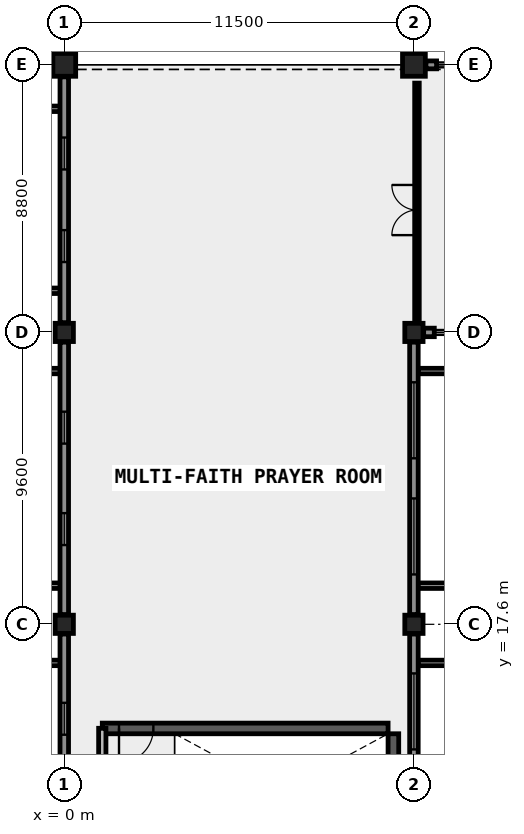
"""IFC4 building model, lengths in metres.
Left out: names, types, materials, properties, quantities, classifications, styles, units other than length and angle.
Written with IfcOpenShell. Run it as: python <this file> out.ifc"""

import sys

from ifc_helpers import new_model, si_unit, direction, frame, frame_2d, origin, origin_2d, place, context, subcontext, project, spatial, rectangle, extrude, element, fill, save


model = new_model("IFC4")
c1 = context("Model", 3, precision=1e-05, world=origin(), true_north=direction((0.0, 1.0)))
c2 = subcontext(c1, "Body", "Model", "MODEL_VIEW")
j1 = project(units=[si_unit("LENGTHUNIT", "METRE"), si_unit("PLANEANGLEUNIT", "RADIAN")], contexts=[c1])
p1 = place(None, origin())
s1 = spatial("IfcSite", under=j1, at=p1, CompositionType="ELEMENT")
p2 = place(p1, origin())
s2 = spatial("IfcBuilding", under=s1, at=p2, CompositionType="ELEMENT")
p3 = place(p2, frame((0.0, 0.0, 8.4)))
s3 = spatial("IfcBuildingStorey", under=s2, at=p3, CompositionType="ELEMENT", Elevation=8.4)
for number, where, z_axis, x_axis in (
    (1, (0.0, 17.6, 0.0), (0.0, 0.0, 1.0), (1.0, 0.0, 0.0)),
    (2, (0.0, 27.2, 0.0), (0.0, 0.0, 1.0), (1.0, 0.0, 0.0)),
):
    element("IfcColumn", number, at=place(p3, frame(where, z_axis=z_axis, x_axis=x_axis)), inside=s3, PredefinedType="COLUMN", context=c2, shape_type="SweptSolid", body=[
        extrude(rectangle(XDim=0.6, YDim=0.6, at=origin_2d()), origin(), (0.0, 0.0, 1.0), 5.4),
    ])
p4 = place(p3, frame((0.0, 36.0, 0.0), z_axis=(0.0, 0.0, 1.0), x_axis=(1.0, 0.0, 0.0)))
e3 = element("IfcColumn", 3, at=p4, inside=s3, PredefinedType="COLUMN", context=c2, shape_type="SweptSolid", body=[
    extrude(rectangle(XDim=0.75, YDim=0.75, at=origin_2d()), origin(), (0.0, 0.0, 1.0), 5.4),
])
for number, where, z_axis, x_axis in (
    (4, (11.5, 17.6, 0.0), (0.0, 0.0, 1.0), (1.0, 0.0, 0.0)),
    (5, (11.5, 27.2, 0.0), (0.0, 0.0, 1.0), (1.0, 0.0, 0.0)),
):
    element("IfcColumn", number, at=place(p3, frame(where, z_axis=z_axis, x_axis=x_axis)), inside=s3, PredefinedType="COLUMN", context=c2, shape_type="SweptSolid", body=[
        extrude(rectangle(XDim=0.6, YDim=0.6, at=origin_2d()), origin(), (0.0, 0.0, 1.0), 5.4),
    ])
p5 = place(p3, frame((11.5, 36.0, 0.0), z_axis=(0.0, 0.0, 1.0), x_axis=(1.0, 0.0, 0.0)))
e6 = element("IfcColumn", 6, at=p5, inside=s3, PredefinedType="COLUMN", context=c2, shape_type="SweptSolid", body=[
    extrude(rectangle(XDim=0.75, YDim=0.75, at=origin_2d()), origin(), (0.0, 0.0, 1.0), 5.4),
])
p6 = place(p3, frame((1.25, 14.175, 0.0), z_axis=(0.0, 0.0, 1.0), x_axis=(1.0, 0.0, 0.0)))
e7 = element("IfcWall", 7, at=p6, inside=s3, PredefinedType="SHEAR", context=c2, shape_type="SweptSolid", body=[
    extrude(rectangle(XDim=9.4, YDim=0.35, at=frame_2d((4.7, 0.0))), origin(), (0.0, 0.0, 1.0), 5.4),
])
p7 = place(p6, frame((0.55, 0.0, 0.0)))
e8 = element("IfcOpeningElement", 8, at=p7, cuts=e7, PredefinedType="OPENING", context=c2, shape_type="SweptSolid", body=[
    extrude(rectangle(XDim=1.13, YDim=2.15, at=frame_2d((0.565, 1.075))), frame((0.0, 0.185, 0.0), z_axis=(0.0, -1.0, 0.0), x_axis=(1.0, 0.0, 0.0)), (0.0, 0.0, 1.0), 0.37),
])
p8 = place(p3, frame((10.825, 10.2, 0.0), z_axis=(0.0, 0.0, 1.0), x_axis=(0.0, 1.0, 0.0)))
e9 = element("IfcWall", 9, at=p8, inside=s3, PredefinedType="SHEAR", context=c2, shape_type="SweptSolid", body=[
    extrude(rectangle(XDim=3.8, YDim=0.35, at=frame_2d((1.9, 0.0))), origin(), (0.0, 0.0, 1.0), 5.4),
])
p9 = place(p3, frame((11.5, 8.395, 0.0), z_axis=(0.0, 0.0, 1.0), x_axis=(0.0, 1.0, 0.0)))
e10 = element("IfcWall", 10, at=p9, inside=s3, PredefinedType="SOLIDWALL", context=c2, shape_type="SweptSolid", body=[
    extrude(rectangle(XDim=8.885, YDim=0.28, at=frame_2d((4.442, 0.0))), origin(), (0.0, 0.0, 1.0), 4.25),
])
p10 = place(p9, frame((1.295, 0.0, 0.85)))
e11 = element("IfcOpeningElement", 11, at=p10, cuts=e10, PredefinedType="OPENING", context=c2, shape_type="SweptSolid", body=[
    extrude(rectangle(XDim=2.5, YDim=2.2, at=frame_2d((1.25, 1.1))), frame((0.0, 0.15, 0.0), z_axis=(0.0, -1.0, 0.0), x_axis=(1.0, 0.0, 0.0)), (0.0, 0.0, 1.0), 0.3),
])
p11 = place(p9, frame((5.09, 0.0, 0.85)))
e12 = element("IfcOpeningElement", 12, at=p11, cuts=e10, PredefinedType="OPENING", context=c2, shape_type="SweptSolid", body=[
    extrude(rectangle(XDim=2.5, YDim=2.2, at=frame_2d((1.25, 1.1))), frame((0.0, 0.15, 0.0), z_axis=(0.0, -1.0, 0.0), x_axis=(1.0, 0.0, 0.0)), (0.0, 0.0, 1.0), 0.3),
])
p12 = place(p3, frame((11.5, 17.92, 0.0), z_axis=(0.0, 0.0, 1.0), x_axis=(0.0, 1.0, 0.0)))
e13 = element("IfcWall", 13, at=p12, inside=s3, PredefinedType="SOLIDWALL", context=c2, shape_type="SweptSolid", body=[
    extrude(rectangle(XDim=8.96, YDim=0.28, at=frame_2d((4.48, 0.0))), origin(), (0.0, 0.0, 1.0), 4.25),
])
p13 = place(p12, frame((1.32, 0.0, 0.85)))
e14 = element("IfcOpeningElement", 14, at=p13, cuts=e13, PredefinedType="OPENING", context=c2, shape_type="SweptSolid", body=[
    extrude(rectangle(XDim=2.5, YDim=2.2, at=frame_2d((1.25, 1.1))), frame((0.0, 0.15, 0.0), z_axis=(0.0, -1.0, 0.0), x_axis=(1.0, 0.0, 0.0)), (0.0, 0.0, 1.0), 0.3),
])
p14 = place(p12, frame((5.14, 0.0, 0.85)))
e15 = element("IfcOpeningElement", 15, at=p14, cuts=e13, PredefinedType="OPENING", context=c2, shape_type="SweptSolid", body=[
    extrude(rectangle(XDim=2.5, YDim=2.2, at=frame_2d((1.25, 1.1))), frame((0.0, 0.15, 0.0), z_axis=(0.0, -1.0, 0.0), x_axis=(1.0, 0.0, 0.0)), (0.0, 0.0, 1.0), 0.3),
])
p15 = place(p3, frame((11.82, 27.2, 0.0), z_axis=(0.0, 0.0, 1.0), x_axis=(1.0, 0.0, 0.0)))
e16 = element("IfcWall", 16, at=p15, inside=s3, PredefinedType="SOLIDWALL", context=c2, shape_type="SweptSolid", body=[
    extrude(rectangle(XDim=0.35, YDim=0.28, at=frame_2d((0.175, 0.0))), origin(), (0.0, 0.0, 1.0), 5.14),
])
p16 = place(p3, frame((0.0, 8.395, 0.0), z_axis=(0.0, 0.0, 1.0), x_axis=(0.0, 1.0, 0.0)))
e17 = element("IfcWall", 17, at=p16, inside=s3, PredefinedType="SOLIDWALL", context=c2, shape_type="SweptSolid", body=[
    extrude(rectangle(XDim=8.885, YDim=0.28, at=frame_2d((4.442, 0.0))), origin(), (0.0, 0.0, 1.0), 4.45),
])
p17 = place(p16, frame((2.262, 0.0, 0.85)))
e18 = element("IfcOpeningElement", 18, at=p17, cuts=e17, PredefinedType="OPENING", context=c2, shape_type="SweptSolid", body=[
    extrude(rectangle(XDim=1.05, YDim=2.05, at=frame_2d((0.525, 1.025))), frame((0.0, 0.15, 0.0), z_axis=(0.0, -1.0, 0.0), x_axis=(1.0, 0.0, 0.0)), (0.0, 0.0, 1.0), 0.3),
])
p18 = place(p16, frame((5.573, 0.0, 0.85)))
e19 = element("IfcOpeningElement", 19, at=p18, cuts=e17, PredefinedType="OPENING", context=c2, shape_type="SweptSolid", body=[
    extrude(rectangle(XDim=1.05, YDim=2.05, at=frame_2d((0.525, 1.025))), frame((0.0, 0.15, 0.0), z_axis=(0.0, -1.0, 0.0), x_axis=(1.0, 0.0, 0.0)), (0.0, 0.0, 1.0), 0.3),
])
p19 = place(p3, frame((0.0, 17.92, 0.0), z_axis=(0.0, 0.0, 1.0), x_axis=(0.0, 1.0, 0.0)))
e20 = element("IfcWall", 20, at=p19, inside=s3, PredefinedType="SOLIDWALL", context=c2, shape_type="SweptSolid", body=[
    extrude(rectangle(XDim=8.96, YDim=0.28, at=frame_2d((4.48, 0.0))), origin(), (0.0, 0.0, 1.0), 4.45),
])
p20 = place(p19, frame((2.287, 0.0, 0.85)))
e21 = element("IfcOpeningElement", 21, at=p20, cuts=e20, PredefinedType="OPENING", context=c2, shape_type="SweptSolid", body=[
    extrude(rectangle(XDim=1.05, YDim=2.05, at=frame_2d((0.525, 1.025))), frame((0.0, 0.15, 0.0), z_axis=(0.0, -1.0, 0.0), x_axis=(1.0, 0.0, 0.0)), (0.0, 0.0, 1.0), 0.3),
])
p21 = place(p19, frame((5.623, 0.0, 0.85)))
e22 = element("IfcOpeningElement", 22, at=p21, cuts=e20, PredefinedType="OPENING", context=c2, shape_type="SweptSolid", body=[
    extrude(rectangle(XDim=1.05, YDim=2.05, at=frame_2d((0.525, 1.025))), frame((0.0, 0.15, 0.0), z_axis=(0.0, -1.0, 0.0), x_axis=(1.0, 0.0, 0.0)), (0.0, 0.0, 1.0), 0.3),
])
p22 = place(p3, frame((0.0, 27.52, 0.0), z_axis=(0.0, 0.0, 1.0), x_axis=(0.0, 1.0, 0.0)))
e23 = element("IfcWall", 23, at=p22, inside=s3, PredefinedType="SOLIDWALL", context=c2, shape_type="SweptSolid", body=[
    extrude(rectangle(XDim=8.085, YDim=0.28, at=frame_2d((4.042, 0.0))), origin(), (0.0, 0.0, 1.0), 4.45),
])
p23 = place(p22, frame((1.995, 0.0, 0.85)))
e24 = element("IfcOpeningElement", 24, at=p23, cuts=e23, PredefinedType="OPENING", context=c2, shape_type="SweptSolid", body=[
    extrude(rectangle(XDim=1.05, YDim=2.05, at=frame_2d((0.525, 1.025))), frame((0.0, 0.15, 0.0), z_axis=(0.0, -1.0, 0.0), x_axis=(1.0, 0.0, 0.0)), (0.0, 0.0, 1.0), 0.3),
])
p24 = place(p22, frame((5.04, 0.0, 0.85)))
e25 = element("IfcOpeningElement", 25, at=p24, cuts=e23, PredefinedType="OPENING", context=c2, shape_type="SweptSolid", body=[
    extrude(rectangle(XDim=1.05, YDim=2.05, at=frame_2d((0.525, 1.025))), frame((0.0, 0.15, 0.0), z_axis=(0.0, -1.0, 0.0), x_axis=(1.0, 0.0, 0.0)), (0.0, 0.0, 1.0), 0.3),
])
p25 = place(p3, frame((11.895, 36.0, 0.0), z_axis=(0.0, 0.0, 1.0), x_axis=(1.0, 0.0, 0.0)))
e26 = element("IfcWall", 26, at=p25, inside=s3, PredefinedType="SOLIDWALL", context=c2, shape_type="SweptSolid", body=[
    extrude(rectangle(XDim=0.35, YDim=0.26, at=frame_2d((0.175, 0.0))), origin(), (0.0, 0.0, 1.0), 5.1),
])
p26 = place(p3, frame((1.25, 10.02, 0.0), z_axis=(0.0, 0.0, 1.0), x_axis=(0.0, 1.0, 0.0)))
e27 = element("IfcWall", 27, at=p26, inside=s3, PredefinedType="SOLIDWALL", context=c2, shape_type="SweptSolid", body=[
    extrude(rectangle(XDim=4.16, YDim=0.24, at=frame_2d((2.08, 0.0))), origin(), (0.0, 0.0, 1.0), 5.12),
])
p27 = place(p3, frame((11.6, 27.6, 0.0), z_axis=(0.0, 0.0, 1.0), x_axis=(0.0, 1.0, 0.0)))
e28 = element("IfcWall", 28, at=p27, inside=s3, PredefinedType="PARTITIONING", context=c2, shape_type="SweptSolid", body=[
    extrude(rectangle(XDim=7.8, YDim=0.15, at=frame_2d((3.9, 0.0))), origin(), (0.0, 0.0, 1.0), 4.25),
])
p28 = place(p27, frame((2.8, 0.0, 0.0)))
e29 = element("IfcOpeningElement", 29, at=p28, cuts=e28, PredefinedType="OPENING", context=c2, shape_type="SweptSolid", body=[
    extrude(rectangle(XDim=1.65, YDim=2.2, at=frame_2d((0.825, 1.1))), frame((0.0, 0.085, 0.0), z_axis=(0.0, -1.0, 0.0), x_axis=(1.0, 0.0, 0.0)), (0.0, 0.0, 1.0), 0.17),
])
p29 = place(p11, origin())
e30 = element("IfcWindow", 30, at=p29, inside=s3, PartitioningType="SINGLE_PANEL", PredefinedType="WINDOW", context=c2, shape_type="SweptSolid", body=[
    extrude(rectangle(XDim=2.5, YDim=2.2, at=frame_2d((1.25, 1.1))), frame((0.0, 0.03, 0.0), z_axis=(0.0, -1.0, 0.0), x_axis=(1.0, 0.0, 0.0)), (0.0, 0.0, 1.0), 0.06),
])
fill(e12, e30)
p30 = place(p13, origin())
e31 = element("IfcWindow", 31, at=p30, inside=s3, PartitioningType="SINGLE_PANEL", PredefinedType="WINDOW", context=c2, shape_type="SweptSolid", body=[
    extrude(rectangle(XDim=2.5, YDim=2.2, at=frame_2d((1.25, 1.1))), frame((0.0, 0.03, 0.0), z_axis=(0.0, -1.0, 0.0), x_axis=(1.0, 0.0, 0.0)), (0.0, 0.0, 1.0), 0.06),
])
fill(e14, e31)
p31 = place(p14, origin())
e32 = element("IfcWindow", 32, at=p31, inside=s3, PartitioningType="SINGLE_PANEL", PredefinedType="WINDOW", context=c2, shape_type="SweptSolid", body=[
    extrude(rectangle(XDim=2.5, YDim=2.2, at=frame_2d((1.25, 1.1))), frame((0.0, 0.03, 0.0), z_axis=(0.0, -1.0, 0.0), x_axis=(1.0, 0.0, 0.0)), (0.0, 0.0, 1.0), 0.06),
])
fill(e15, e32)
p32 = place(p18, origin())
e33 = element("IfcWindow", 33, at=p32, inside=s3, PartitioningType="SINGLE_PANEL", PredefinedType="WINDOW", context=c2, shape_type="SweptSolid", body=[
    extrude(rectangle(XDim=1.05, YDim=2.05, at=frame_2d((0.525, 1.025))), frame((0.0, 0.03, 0.0), z_axis=(0.0, -1.0, 0.0), x_axis=(1.0, 0.0, 0.0)), (0.0, 0.0, 1.0), 0.06),
])
fill(e19, e33)
p33 = place(p20, origin())
e34 = element("IfcWindow", 34, at=p33, inside=s3, PartitioningType="SINGLE_PANEL", PredefinedType="WINDOW", context=c2, shape_type="SweptSolid", body=[
    extrude(rectangle(XDim=1.05, YDim=2.05, at=frame_2d((0.525, 1.025))), frame((0.0, 0.03, 0.0), z_axis=(0.0, -1.0, 0.0), x_axis=(1.0, 0.0, 0.0)), (0.0, 0.0, 1.0), 0.06),
])
fill(e21, e34)
p34 = place(p21, origin())
e35 = element("IfcWindow", 35, at=p34, inside=s3, PartitioningType="SINGLE_PANEL", PredefinedType="WINDOW", context=c2, shape_type="SweptSolid", body=[
    extrude(rectangle(XDim=1.05, YDim=2.05, at=frame_2d((0.525, 1.025))), frame((0.0, 0.03, 0.0), z_axis=(0.0, -1.0, 0.0), x_axis=(1.0, 0.0, 0.0)), (0.0, 0.0, 1.0), 0.06),
])
fill(e22, e35)
p35 = place(p23, origin())
e36 = element("IfcWindow", 36, at=p35, inside=s3, PartitioningType="SINGLE_PANEL", PredefinedType="WINDOW", context=c2, shape_type="SweptSolid", body=[
    extrude(rectangle(XDim=1.05, YDim=2.05, at=frame_2d((0.525, 1.025))), frame((0.0, 0.03, 0.0), z_axis=(0.0, -1.0, 0.0), x_axis=(1.0, 0.0, 0.0)), (0.0, 0.0, 1.0), 0.06),
])
fill(e24, e36)
p36 = place(p24, origin())
e37 = element("IfcWindow", 37, at=p36, inside=s3, PartitioningType="SINGLE_PANEL", PredefinedType="WINDOW", context=c2, shape_type="SweptSolid", body=[
    extrude(rectangle(XDim=1.05, YDim=2.05, at=frame_2d((0.525, 1.025))), frame((0.0, 0.03, 0.0), z_axis=(0.0, -1.0, 0.0), x_axis=(1.0, 0.0, 0.0)), (0.0, 0.0, 1.0), 0.06),
])
fill(e25, e37)
p37 = place(p7, frame((0.565, 0.0, 0.0), z_axis=(0.0, 0.0, 1.0), x_axis=(-1.0, 0.0, 0.0)))
e38 = element("IfcDoor", 38, at=p37, inside=s3, OperationType="SINGLE_SWING_LEFT", PredefinedType="DOOR", context=c2, shape_type="SweptSolid", body=[
    extrude(rectangle(XDim=1.13, YDim=2.15, at=frame_2d((0.0, 1.075))), frame((0.0, 0.025, 0.0), z_axis=(0.0, -1.0, 0.0), x_axis=(1.0, 0.0, 0.0)), (0.0, 0.0, 1.0), 0.05),
])
fill(e8, e38)
p38 = place(p28, origin())
e39 = element("IfcDoor", 39, at=p38, inside=s3, OperationType="DOUBLE_DOOR_SINGLE_SWING", PredefinedType="DOOR", context=c2, shape_type="SweptSolid", body=[
    extrude(rectangle(XDim=1.65, YDim=2.2, at=frame_2d((0.825, 1.1))), frame((0.0, 0.025, 0.0), z_axis=(0.0, -1.0, 0.0), x_axis=(1.0, 0.0, 0.0)), (0.0, 0.0, 1.0), 0.05),
])
fill(e29, e39)
save(model, sys.argv[1])
